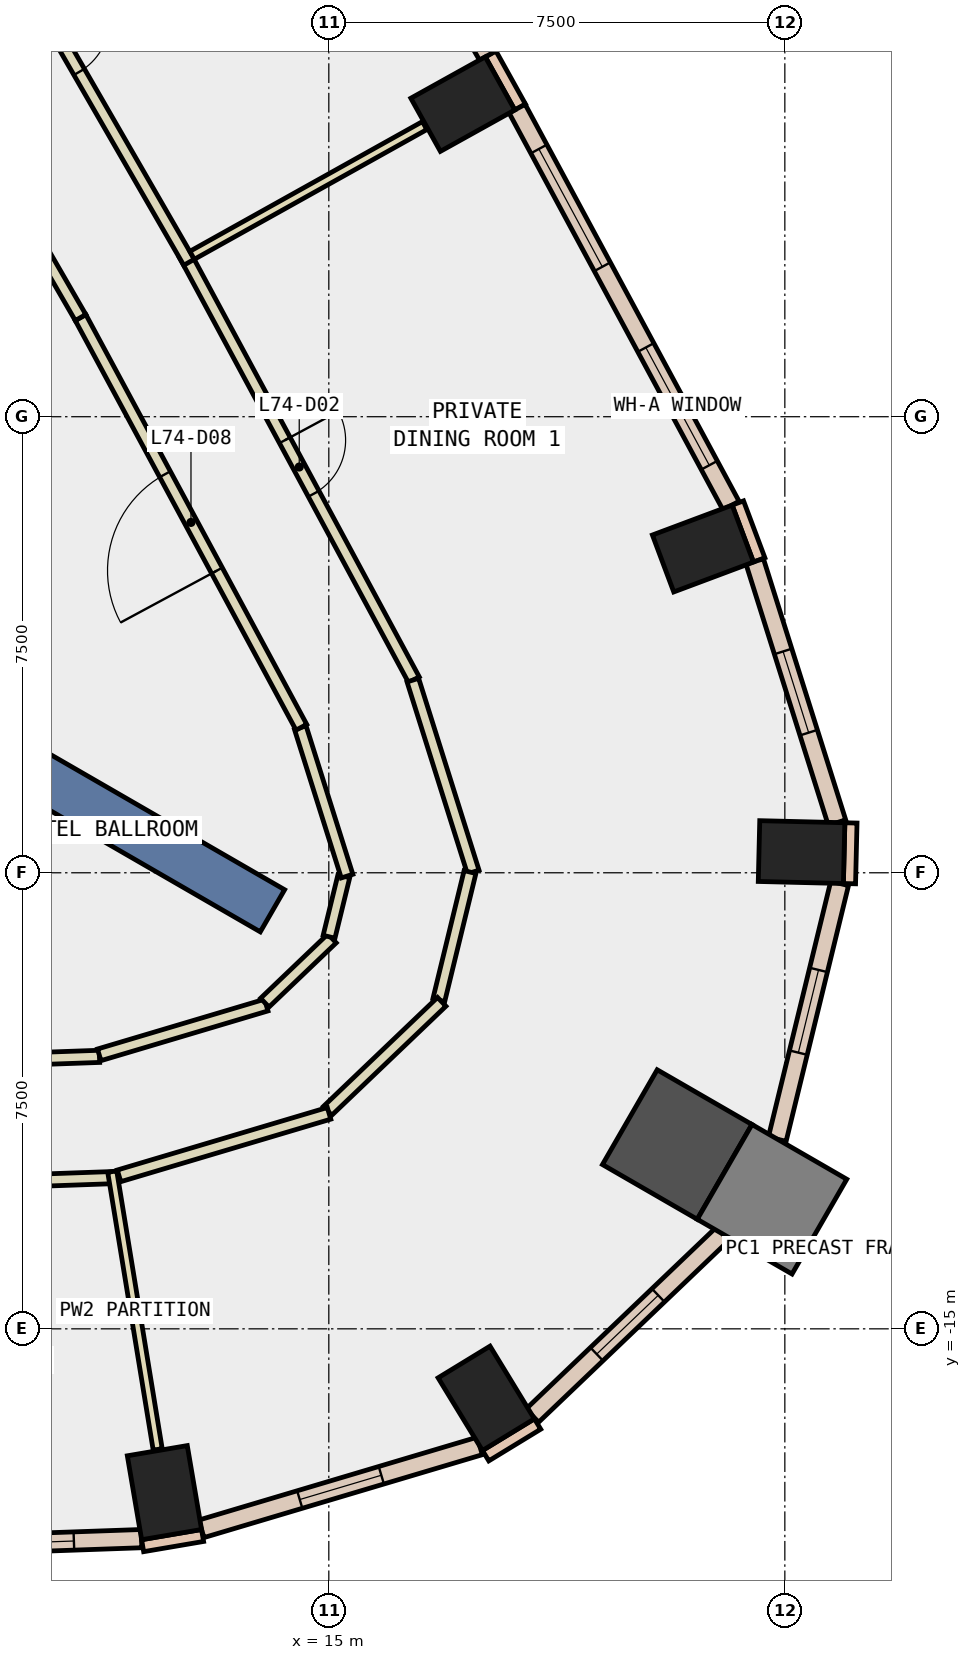
"""IFC4 building model, lengths in metres.
Left out: names, types, materials, properties, quantities, classifications, styles, units other than length and angle.
Written with IfcOpenShell. Run it as: python <this file> out.ifc"""

import sys

from ifc_helpers import new_model, si_unit, direction, frame, frame_2d, origin, origin_2d, place, context, subcontext, project, spatial, rectangle, extrude, element, fill, save


model = new_model("IFC4")
c1 = context("Model", 3, precision=1e-05, world=origin(), true_north=direction((0.0, 1.0)))
c2 = subcontext(c1, "Body", "Model", "MODEL_VIEW")
j1 = project(units=[si_unit("LENGTHUNIT", "METRE"), si_unit("PLANEANGLEUNIT", "RADIAN")], contexts=[c1])
p1 = place(None, origin())
s1 = spatial("IfcSite", under=j1, at=p1, CompositionType="ELEMENT")
p2 = place(p1, origin())
s2 = spatial("IfcBuilding", under=s1, at=p2, CompositionType="ELEMENT")
p3 = place(p2, frame((0.0, 0.0, 315.2)))
s3 = spatial("IfcBuildingStorey", under=s2, at=p3, CompositionType="ELEMENT", Elevation=315.2)
for number, where, z_axis, x_axis in (
    (1, (12.297, -17.694, -0.34), (0.0, 0.0, 1.0), (0.986, 0.168, 0.0)),
    (2, (17.589, -16.143, -0.34), (0.0, 0.0, 1.0), (0.854, 0.521, 0.0)),
):
    element("IfcColumn", number, at=place(p3, frame(where, z_axis=z_axis, x_axis=x_axis)), inside=s3, PredefinedType="COLUMN", context=c2, shape_type="SweptSolid", body=[
        extrude(rectangle(XDim=1.0, YDim=1.4, at=origin_2d()), origin(), (0.0, 0.0, 1.0), 3.6),
    ])
p4 = place(p3, frame((20.73, -11.969, -0.34), z_axis=(0.0, 0.0, 1.0), x_axis=(-0.866025403784, 0.5, 0.0)))
e3 = element("IfcColumn", 3, at=p4, inside=s3, PredefinedType="COLUMN", context=c2, shape_type="SweptSolid", body=[
    extrude(rectangle(XDim=1.8, YDim=1.8, at=origin_2d()), origin(), (0.0, 0.0, 1.0), 3.6),
])
for number, where, z_axis, x_axis in (
    (4, (22.775, -7.16, -0.34), (0.0, 0.0, 1.0), (0.024, 1.0, 0.0)),
    (5, (21.153, -2.168, -0.34), (0.0, 0.0, 1.0), (-0.351, 0.936, 0.0)),
    (6, (17.204, 5.141, -0.34), (0.0, 0.0, 1.0), (-0.486, 0.874, 0.0)),
):
    element("IfcColumn", number, at=place(p3, frame(where, z_axis=z_axis, x_axis=x_axis)), inside=s3, PredefinedType="COLUMN", context=c2, shape_type="SweptSolid", body=[
        extrude(rectangle(XDim=1.0, YDim=1.4, at=origin_2d()), origin(), (0.0, 0.0, 1.0), 3.6),
    ])
p5 = place(p3, frame((22.289, -12.869, -0.34), z_axis=(0.0, 0.0, 1.0), x_axis=(-0.866025403784, 0.5, 0.0)))
e7 = element("IfcColumn", 7, at=p5, inside=s3, PredefinedType="COLUMN", context=c2, shape_type="SweptSolid", body=[
    extrude(rectangle(XDim=1.8, YDim=1.8, at=origin_2d()), origin(), (0.0, 0.0, 1.0), 3.6),
])
p6 = place(p3, frame((6.279, -3.625, -0.34), z_axis=(0.0, 0.0, 1.0), x_axis=(0.866017533419, -0.500013631625, 0.0)))
e8 = element("IfcWall", 8, at=p6, inside=s3, PredefinedType="SHEAR", context=c2, shape_type="SweptSolid", body=[
    extrude(rectangle(XDim=9.0, YDim=0.8, at=frame_2d((4.5, 0.0))), origin(), (0.0, 0.0, 1.0), 3.6),
])
p7 = place(p3, frame((22.078, -2.355, 0.0), z_axis=(0.0, 0.0, 1.0), x_axis=(-0.350962844851, 0.936389385637, 0.0)))
e9 = element("IfcWall", 9, at=p7, inside=s3, PredefinedType="STANDARD", context=c2, shape_type="SweptSolid", body=[
    extrude(rectangle(XDim=1.0, YDim=0.2, at=frame_2d((0.5, 0.0))), origin(), (0.0, 0.0, 1.0), 3.26),
])
p8 = place(p3, frame((18.147, 5.092, 0.0), z_axis=(0.0, 0.0, 1.0), x_axis=(-0.486036693078, 0.873938403425, 0.0)))
e10 = element("IfcWall", 10, at=p8, inside=s3, PredefinedType="STANDARD", context=c2, shape_type="SweptSolid", body=[
    extrude(rectangle(XDim=1.0, YDim=0.2, at=frame_2d((0.5, 0.0))), origin(), (0.0, 0.0, 1.0), 3.26),
])
p9 = place(p3, frame((11.938, -18.566, 0.0), z_axis=(0.0, 0.0, 1.0), x_axis=(0.985800545746, 0.167920469293, 0.0)))
e11 = element("IfcWall", 11, at=p9, inside=s3, PredefinedType="STANDARD", context=c2, shape_type="SweptSolid", body=[
    extrude(rectangle(XDim=1.0, YDim=0.2, at=frame_2d((0.5, 0.0))), origin(), (0.0, 0.0, 1.0), 3.26),
])
p10 = place(p3, frame((17.579, -17.086, 0.0), z_axis=(0.0, 0.0, 1.0), x_axis=(0.853679739553, 0.520798331677, 0.0)))
e12 = element("IfcWall", 12, at=p10, inside=s3, PredefinedType="STANDARD", context=c2, shape_type="SweptSolid", body=[
    extrude(rectangle(XDim=1.0, YDim=0.2, at=frame_2d((0.5, 0.0))), origin(), (0.0, 0.0, 1.0), 3.26),
])
p11 = place(p3, frame((23.563, -7.679, 0.0), z_axis=(0.0, 0.0, 1.0), x_axis=(0.023942303888, 0.999713341956, 0.0)))
e13 = element("IfcWall", 13, at=p11, inside=s3, PredefinedType="STANDARD", context=c2, shape_type="SweptSolid", body=[
    extrude(rectangle(XDim=0.999, YDim=0.2, at=frame_2d((0.5, 0.0))), origin(), (0.0, 0.0, 1.0), 3.26),
])
p12 = place(p3, frame((8.296, -18.578, 0.0), z_axis=(0.0, 0.0, 1.0), x_axis=(0.999377185233, 0.035287981473, 0.0)))
e14 = element("IfcWall", 14, at=p12, inside=s3, PredefinedType="STANDARD", context=c2, shape_type="SweptSolid", body=[
    extrude(rectangle(XDim=3.625, YDim=0.3, at=frame_2d((1.812, 0.0))), origin(), (0.0, 0.0, 1.0), 3.26),
])
p13 = place(p12, frame((1.113, 0.0, 0.9)))
e15 = element("IfcOpeningElement", 15, at=p13, cuts=e14, PredefinedType="OPENING", context=c2, shape_type="SweptSolid", body=[
    extrude(rectangle(XDim=1.4, YDim=2.0, at=frame_2d((0.7, 1.0))), frame((0.0, 0.16, 0.0), z_axis=(0.0, -1.0, 0.0), x_axis=(1.0, 0.0, 0.0)), (0.0, 0.0, 1.0), 0.32),
])
p14 = place(p3, frame((12.904, -18.289, 0.0), z_axis=(0.0, 0.0, 1.0), x_axis=(0.95841929886, 0.285363711031, 0.0)))
e16 = element("IfcWall", 16, at=p14, inside=s3, PredefinedType="STANDARD", context=c2, shape_type="SweptSolid", body=[
    extrude(rectangle(XDim=4.777, YDim=0.3, at=frame_2d((2.388, 0.0))), origin(), (0.0, 0.0, 1.0), 3.26),
])
p15 = place(p14, frame((1.688, 0.0, 0.9)))
e17 = element("IfcOpeningElement", 17, at=p15, cuts=e16, PredefinedType="OPENING", context=c2, shape_type="SweptSolid", body=[
    extrude(rectangle(XDim=1.4, YDim=2.0, at=frame_2d((0.7, 1.0))), frame((0.0, 0.16, 0.0), z_axis=(0.0, -1.0, 0.0), x_axis=(1.0, 0.0, 0.0)), (0.0, 0.0, 1.0), 0.32),
])
p16 = place(p3, frame((18.347, -16.427, 0.0), z_axis=(0.0, 0.0, 1.0), x_axis=(0.723113419412, 0.690729312152, 0.0)))
e18 = element("IfcWall", 18, at=p16, inside=s3, PredefinedType="STANDARD", context=c2, shape_type="SweptSolid", body=[
    extrude(rectangle(XDim=4.327, YDim=0.3, at=frame_2d((2.164, 0.0))), origin(), (0.0, 0.0, 1.0), 3.26),
])
p17 = place(p16, frame((1.464, 0.0, 0.9)))
e19 = element("IfcOpeningElement", 19, at=p17, cuts=e18, PredefinedType="OPENING", context=c2, shape_type="SweptSolid", body=[
    extrude(rectangle(XDim=1.4, YDim=2.0, at=frame_2d((0.7, 1.0))), frame((0.0, 0.16, 0.0), z_axis=(0.0, -1.0, 0.0), x_axis=(1.0, 0.0, 0.0)), (0.0, 0.0, 1.0), 0.32),
])
p18 = place(p3, frame((22.375, -11.881, 0.0), z_axis=(0.0, 0.0, 1.0), x_axis=(0.236958776561, 0.971519705519, 0.0)))
e20 = element("IfcWall", 20, at=p18, inside=s3, PredefinedType="STANDARD", context=c2, shape_type="SweptSolid", body=[
    extrude(rectangle(XDim=4.329, YDim=0.3, at=frame_2d((2.165, 0.0))), origin(), (0.0, 0.0, 1.0), 3.26),
])
p19 = place(p18, frame((1.465, 0.0, 0.9)))
e21 = element("IfcOpeningElement", 21, at=p19, cuts=e20, PredefinedType="OPENING", context=c2, shape_type="SweptSolid", body=[
    extrude(rectangle(XDim=1.4, YDim=2.0, at=frame_2d((0.7, 1.0))), frame((0.0, 0.16, 0.0), z_axis=(0.0, -1.0, 0.0), x_axis=(1.0, 0.0, 0.0)), (0.0, 0.0, 1.0), 0.32),
])
p20 = place(p3, frame((23.358, -6.675, 0.0), z_axis=(0.0, 0.0, 1.0), x_axis=(-0.300534385574, 0.953770980418, 0.0)))
e22 = element("IfcWall", 22, at=p20, inside=s3, PredefinedType="STANDARD", context=c2, shape_type="SweptSolid", body=[
    extrude(rectangle(XDim=4.502, YDim=0.3, at=frame_2d((2.251, 0.0))), origin(), (0.0, 0.0, 1.0), 3.26),
])
p21 = place(p20, frame((1.551, 0.0, 0.9)))
e23 = element("IfcOpeningElement", 23, at=p21, cuts=e22, PredefinedType="OPENING", context=c2, shape_type="SweptSolid", body=[
    extrude(rectangle(XDim=1.4, YDim=2.0, at=frame_2d((0.7, 1.0))), frame((0.0, 0.16, 0.0), z_axis=(0.0, -1.0, 0.0), x_axis=(1.0, 0.0, 0.0)), (0.0, 0.0, 1.0), 0.32),
])
p22 = place(p3, frame((21.615, -1.462, 0.0), z_axis=(0.0, 0.0, 1.0), x_axis=(-0.474421773145, 0.880297666228, 0.0)))
e24 = element("IfcWall", 24, at=p22, inside=s3, PredefinedType="STANDARD", context=c2, shape_type="SweptSolid", body=[
    extrude(rectangle(XDim=7.416, YDim=0.3, at=frame_2d((3.708, 0.0))), origin(), (0.0, 0.0, 1.0), 3.26),
])
p23 = place(p22, frame((0.754, 0.0, 0.9)))
e25 = element("IfcOpeningElement", 25, at=p23, cuts=e24, PredefinedType="OPENING", context=c2, shape_type="SweptSolid", body=[
    extrude(rectangle(XDim=2.2, YDim=2.0, at=frame_2d((1.1, 1.0))), frame((0.0, 0.16, 0.0), z_axis=(0.0, -1.0, 0.0), x_axis=(1.0, 0.0, 0.0)), (0.0, 0.0, 1.0), 0.32),
])
p24 = place(p22, frame((4.462, 0.0, 0.9)))
e26 = element("IfcOpeningElement", 26, at=p24, cuts=e24, PredefinedType="OPENING", context=c2, shape_type="SweptSolid", body=[
    extrude(rectangle(XDim=2.2, YDim=2.0, at=frame_2d((1.1, 1.0))), frame((0.0, 0.16, 0.0), z_axis=(0.0, -1.0, 0.0), x_axis=(1.0, 0.0, 0.0)), (0.0, 0.0, 1.0), 0.32),
])
p25 = place(p3, frame((17.61, 5.937, 0.0), z_axis=(0.0, 0.0, 1.0), x_axis=(-0.499923391538, 0.866069629183, 0.0)))
e27 = element("IfcWall", 27, at=p25, inside=s3, PredefinedType="STANDARD", context=c2, shape_type="SweptSolid", body=[
    extrude(rectangle(XDim=7.327, YDim=0.3, at=frame_2d((3.664, 0.0))), origin(), (0.0, 0.0, 1.0), 3.26),
])
p26 = place(p25, frame((0.732, 0.0, 0.9)))
e28 = element("IfcOpeningElement", 28, at=p26, cuts=e27, PredefinedType="OPENING", context=c2, shape_type="SweptSolid", body=[
    extrude(rectangle(XDim=2.2, YDim=2.0, at=frame_2d((1.1, 1.0))), frame((0.0, 0.16, 0.0), z_axis=(0.0, -1.0, 0.0), x_axis=(1.0, 0.0, 0.0)), (0.0, 0.0, 1.0), 0.32),
])
p27 = place(p25, frame((4.395, 0.0, 0.9)))
e29 = element("IfcOpeningElement", 29, at=p27, cuts=e27, PredefinedType="OPENING", context=c2, shape_type="SweptSolid", body=[
    extrude(rectangle(XDim=2.2, YDim=2.0, at=frame_2d((1.1, 1.0))), frame((0.0, 0.16, 0.0), z_axis=(0.0, -1.0, 0.0), x_axis=(1.0, 0.0, 0.0)), (0.0, 0.0, 1.0), 0.32),
])
p28 = place(p3, frame((7.9, -10.637, 0.0), z_axis=(0.0, 0.0, 1.0), x_axis=(0.999372900517, 0.035409119054, 0.0)))
e30 = element("IfcWall", 30, at=p28, inside=s3, PredefinedType="PARTITIONING", context=c2, shape_type="SweptSolid", body=[
    extrude(rectangle(XDim=3.33, YDim=0.2, at=frame_2d((1.665, 0.0))), origin(), (0.0, 0.0, 1.0), 3.26),
])
p29 = place(p3, frame((11.224, -10.494, 0.0), z_axis=(0.0, 0.0, 1.0), x_axis=(0.958417413979, 0.285370041492, 0.0)))
e31 = element("IfcWall", 31, at=p29, inside=s3, PredefinedType="PARTITIONING", context=c2, shape_type="SweptSolid", body=[
    extrude(rectangle(XDim=2.866, YDim=0.2, at=frame_2d((1.433, 0.0))), origin(), (0.0, 0.0, 1.0), 3.26),
])
p30 = place(p3, frame((13.947, -9.636, 0.0), z_axis=(0.0, 0.0, 1.0), x_axis=(0.723283043556, 0.690551691696, 0.0)))
e32 = element("IfcWall", 32, at=p30, inside=s3, PredefinedType="PARTITIONING", context=c2, shape_type="SweptSolid", body=[
    extrude(rectangle(XDim=1.529, YDim=0.2, at=frame_2d((0.765, 0.0))), origin(), (0.0, 0.0, 1.0), 3.26),
])
p31 = place(p3, frame((15.004, -8.552, 0.0), z_axis=(0.0, 0.0, 1.0), x_axis=(0.237373129266, 0.971418549083, 0.0)))
e33 = element("IfcWall", 33, at=p31, inside=s3, PredefinedType="PARTITIONING", context=c2, shape_type="SweptSolid", body=[
    extrude(rectangle(XDim=1.024, YDim=0.2, at=frame_2d((0.512, 0.0))), origin(), (0.0, 0.0, 1.0), 3.26),
])
p32 = place(p3, frame((15.3, -7.555, 0.0), z_axis=(0.0, 0.0, 1.0), x_axis=(-0.300501248013, 0.953781421471, 0.0)))
e34 = element("IfcWall", 34, at=p32, inside=s3, PredefinedType="PARTITIONING", context=c2, shape_type="SweptSolid", body=[
    extrude(rectangle(XDim=2.559, YDim=0.2, at=frame_2d((1.28, 0.0))), origin(), (0.0, 0.0, 1.0), 3.26),
])
p33 = place(p3, frame((14.549, -5.107, 0.0), z_axis=(0.0, 0.0, 1.0), x_axis=(-0.47449538478, 0.880257990491, 0.0)))
e35 = element("IfcWall", 35, at=p33, inside=s3, PredefinedType="PARTITIONING", context=c2, shape_type="SweptSolid", body=[
    extrude(rectangle(XDim=7.655, YDim=0.2, at=frame_2d((3.827, 0.0))), origin(), (0.0, 0.0, 1.0), 3.26),
])
p34 = place(p33, frame((2.927, 0.0, 0.0)))
e36 = element("IfcOpeningElement", 36, at=p34, cuts=e35, PredefinedType="OPENING", context=c2, shape_type="SweptSolid", body=[
    extrude(rectangle(XDim=1.8, YDim=2.1, at=frame_2d((0.9, 1.05))), frame((0.0, 0.11, 0.0), z_axis=(0.0, -1.0, 0.0), x_axis=(1.0, 0.0, 0.0)), (0.0, 0.0, 1.0), 0.22),
])
p35 = place(p3, frame((10.917, 1.631, 0.0), z_axis=(0.0, 0.0, 1.0), x_axis=(-0.500699613169, 0.865621104972, 0.0)))
e37 = element("IfcWall", 37, at=p35, inside=s3, PredefinedType="PARTITIONING", context=c2, shape_type="SweptSolid", body=[
    extrude(rectangle(XDim=1.715, YDim=0.2, at=frame_2d((0.858, 0.0))), origin(), (0.0, 0.0, 1.0), 3.26),
])
p36 = place(p3, frame((11.479, -12.512, 0.0), z_axis=(0.0, 0.0, 1.0), x_axis=(-0.999371508837, -0.035448375484, 0.0)))
e38 = element("IfcWall", 38, at=p36, inside=s3, PredefinedType="PARTITIONING", context=c2, shape_type="SweptSolid", body=[
    extrude(rectangle(XDim=3.581, YDim=0.2, at=frame_2d((1.791, 0.0))), origin(), (0.0, 0.0, 1.0), 3.26),
])
p37 = place(p3, frame((12.628, 2.671, 0.0), z_axis=(0.0, 0.0, 1.0), x_axis=(0.474489967676, -0.880260910512, 0.0)))
e39 = element("IfcWall", 39, at=p37, inside=s3, PredefinedType="PARTITIONING", context=c2, shape_type="SweptSolid", body=[
    extrude(rectangle(XDim=7.948, YDim=0.2, at=frame_2d((3.974, 0.0))), origin(), (0.0, 0.0, 1.0), 3.26),
])
p38 = place(p37, frame((3.474, 0.0, 0.0)))
e40 = element("IfcOpeningElement", 40, at=p38, cuts=e39, PredefinedType="OPENING", context=c2, shape_type="SweptSolid", body=[
    extrude(rectangle(XDim=1.0, YDim=2.1, at=frame_2d((0.5, 1.05))), frame((0.0, 0.11, 0.0), z_axis=(0.0, -1.0, 0.0), x_axis=(1.0, 0.0, 0.0)), (0.0, 0.0, 1.0), 0.22),
])
p39 = place(p3, frame((16.382, -4.332, 0.0), z_axis=(0.0, 0.0, 1.0), x_axis=(0.300195088058, -0.953877827138, 0.0)))
e41 = element("IfcWall", 41, at=p39, inside=s3, PredefinedType="PARTITIONING", context=c2, shape_type="SweptSolid", body=[
    extrude(rectangle(XDim=3.308, YDim=0.2, at=frame_2d((1.654, 0.0))), origin(), (0.0, 0.0, 1.0), 3.26),
])
p40 = place(p3, frame((17.322, -7.488, 0.0), z_axis=(0.0, 0.0, 1.0), x_axis=(-0.23664760587, -0.971595548897, 0.0)))
e42 = element("IfcWall", 42, at=p40, inside=s3, PredefinedType="PARTITIONING", context=c2, shape_type="SweptSolid", body=[
    extrude(rectangle(XDim=2.167, YDim=0.2, at=frame_2d((1.084, 0.0))), origin(), (0.0, 0.0, 1.0), 3.26),
])
p41 = place(p3, frame((16.857, -9.622, 0.0), z_axis=(0.0, 0.0, 1.0), x_axis=(-0.723099256445, -0.690744138831, 0.0)))
e43 = element("IfcWall", 43, at=p41, inside=s3, PredefinedType="PARTITIONING", context=c2, shape_type="SweptSolid", body=[
    extrude(rectangle(XDim=2.596, YDim=0.2, at=frame_2d((1.298, 0.0))), origin(), (0.0, 0.0, 1.0), 3.26),
])
p42 = place(p3, frame((15.004, -11.456, 0.0), z_axis=(0.0, 0.0, 1.0), x_axis=(-0.958459796003, -0.285227662485, 0.0)))
e44 = element("IfcWall", 44, at=p42, inside=s3, PredefinedType="PARTITIONING", context=c2, shape_type="SweptSolid", body=[
    extrude(rectangle(XDim=3.604, YDim=0.2, at=frame_2d((1.802, 0.0))), origin(), (0.0, 0.0, 1.0), 3.26),
])
p43 = place(p3, frame((8.588, 9.665, 0.0), z_axis=(0.0, 0.0, 1.0), x_axis=(0.499946799636, -0.86605611685, 0.0)))
e45 = element("IfcWall", 45, at=p43, inside=s3, PredefinedType="PARTITIONING", context=c2, shape_type="SweptSolid", body=[
    extrude(rectangle(XDim=8.227, YDim=0.2, at=frame_2d((4.114, 0.0))), origin(), (0.0, 0.0, 1.0), 3.26),
])
p44 = place(p43, frame((3.613, 0.0, 0.0)))
e46 = element("IfcOpeningElement", 46, at=p44, cuts=e45, PredefinedType="OPENING", context=c2, shape_type="SweptSolid", body=[
    extrude(rectangle(XDim=1.0, YDim=2.1, at=frame_2d((0.5, 1.05))), frame((0.0, 0.11, 0.0), z_axis=(0.0, -1.0, 0.0), x_axis=(1.0, 0.0, 0.0)), (0.0, 0.0, 1.0), 0.22),
])
p45 = place(p3, frame((11.438, -12.414, 0.0), z_axis=(0.0, 0.0, 1.0), x_axis=(0.161576343941, -0.986860215572, 0.0)))
e47 = element("IfcWall", 47, at=p45, inside=s3, PredefinedType="PARTITIONING", context=c2, shape_type="SweptSolid", body=[
    extrude(rectangle(XDim=4.63, YDim=0.15, at=frame_2d((2.315, 0.0))), origin(), (0.0, 0.0, 1.0), 3.26),
])
p46 = place(p3, frame((12.751, 2.654, 0.0), z_axis=(0.0, 0.0, 1.0), x_axis=(0.873277679945, 0.487222837837, 0.0)))
e48 = element("IfcWall", 48, at=p46, inside=s3, PredefinedType="PARTITIONING", context=c2, shape_type="SweptSolid", body=[
    extrude(rectangle(XDim=4.38, YDim=0.15, at=frame_2d((2.19, 0.0))), origin(), (0.0, 0.0, 1.0), 3.26),
])
p47 = place(p13, origin())
e49 = element("IfcWindow", 49, at=p47, inside=s3, PartitioningType="SINGLE_PANEL", PredefinedType="WINDOW", context=c2, shape_type="SweptSolid", body=[
    extrude(rectangle(XDim=1.4, YDim=2.0, at=frame_2d((0.7, 1.0))), frame((0.0, 0.03, 0.0), z_axis=(0.0, -1.0, 0.0), x_axis=(1.0, 0.0, 0.0)), (0.0, 0.0, 1.0), 0.06),
])
fill(e15, e49)
p48 = place(p15, origin())
e50 = element("IfcWindow", 50, at=p48, inside=s3, PartitioningType="SINGLE_PANEL", PredefinedType="WINDOW", context=c2, shape_type="SweptSolid", body=[
    extrude(rectangle(XDim=1.4, YDim=2.0, at=frame_2d((0.7, 1.0))), frame((0.0, 0.03, 0.0), z_axis=(0.0, -1.0, 0.0), x_axis=(1.0, 0.0, 0.0)), (0.0, 0.0, 1.0), 0.06),
])
fill(e17, e50)
p49 = place(p17, origin())
e51 = element("IfcWindow", 51, at=p49, inside=s3, PartitioningType="SINGLE_PANEL", PredefinedType="WINDOW", context=c2, shape_type="SweptSolid", body=[
    extrude(rectangle(XDim=1.4, YDim=2.0, at=frame_2d((0.7, 1.0))), frame((0.0, 0.03, 0.0), z_axis=(0.0, -1.0, 0.0), x_axis=(1.0, 0.0, 0.0)), (0.0, 0.0, 1.0), 0.06),
])
fill(e19, e51)
p50 = place(p19, origin())
e52 = element("IfcWindow", 52, at=p50, inside=s3, PartitioningType="SINGLE_PANEL", PredefinedType="WINDOW", context=c2, shape_type="SweptSolid", body=[
    extrude(rectangle(XDim=1.4, YDim=2.0, at=frame_2d((0.7, 1.0))), frame((0.0, 0.03, 0.0), z_axis=(0.0, -1.0, 0.0), x_axis=(1.0, 0.0, 0.0)), (0.0, 0.0, 1.0), 0.06),
])
fill(e21, e52)
p51 = place(p21, origin())
e53 = element("IfcWindow", 53, at=p51, inside=s3, PartitioningType="SINGLE_PANEL", PredefinedType="WINDOW", context=c2, shape_type="SweptSolid", body=[
    extrude(rectangle(XDim=1.4, YDim=2.0, at=frame_2d((0.7, 1.0))), frame((0.0, 0.03, 0.0), z_axis=(0.0, -1.0, 0.0), x_axis=(1.0, 0.0, 0.0)), (0.0, 0.0, 1.0), 0.06),
])
fill(e23, e53)
p52 = place(p23, origin())
e54 = element("IfcWindow", 54, at=p52, inside=s3, PartitioningType="SINGLE_PANEL", PredefinedType="WINDOW", context=c2, shape_type="SweptSolid", body=[
    extrude(rectangle(XDim=2.2, YDim=2.0, at=frame_2d((1.1, 1.0))), frame((0.0, 0.03, 0.0), z_axis=(0.0, -1.0, 0.0), x_axis=(1.0, 0.0, 0.0)), (0.0, 0.0, 1.0), 0.06),
])
fill(e25, e54)
p53 = place(p24, origin())
e55 = element("IfcWindow", 55, at=p53, inside=s3, PartitioningType="SINGLE_PANEL", PredefinedType="WINDOW", context=c2, shape_type="SweptSolid", body=[
    extrude(rectangle(XDim=2.2, YDim=2.0, at=frame_2d((1.1, 1.0))), frame((0.0, 0.03, 0.0), z_axis=(0.0, -1.0, 0.0), x_axis=(1.0, 0.0, 0.0)), (0.0, 0.0, 1.0), 0.06),
])
fill(e26, e55)
p54 = place(p38, origin())
e56 = element("IfcDoor", 56, at=p54, inside=s3, OperationType="SINGLE_SWING_LEFT", PredefinedType="DOOR", context=c2, shape_type="SweptSolid", body=[
    extrude(rectangle(XDim=1.0, YDim=2.1, at=frame_2d((0.5, 1.05))), frame((0.0, 0.025, 0.0), z_axis=(0.0, -1.0, 0.0), x_axis=(1.0, 0.0, 0.0)), (0.0, 0.0, 1.0), 0.05),
])
fill(e40, e56)
p55 = place(p44, origin())
e57 = element("IfcDoor", 57, at=p55, inside=s3, OperationType="SINGLE_SWING_RIGHT", PredefinedType="DOOR", context=c2, shape_type="SweptSolid", body=[
    extrude(rectangle(XDim=1.0, YDim=2.1, at=frame_2d((0.5, 1.05))), frame((0.0, 0.025, 0.0), z_axis=(0.0, -1.0, 0.0), x_axis=(1.0, 0.0, 0.0)), (0.0, 0.0, 1.0), 0.05),
])
fill(e46, e57)
p56 = place(p34, origin())
e58 = element("IfcDoor", 58, at=p56, inside=s3, OperationType="DOUBLE_DOOR_SINGLE_SWING", PredefinedType="DOOR", context=c2, shape_type="SweptSolid", body=[
    extrude(rectangle(XDim=1.8, YDim=2.1, at=frame_2d((0.9, 1.05))), frame((0.0, 0.025, 0.0), z_axis=(0.0, -1.0, 0.0), x_axis=(1.0, 0.0, 0.0)), (0.0, 0.0, 1.0), 0.05),
])
fill(e36, e58)
save(model, sys.argv[1])
